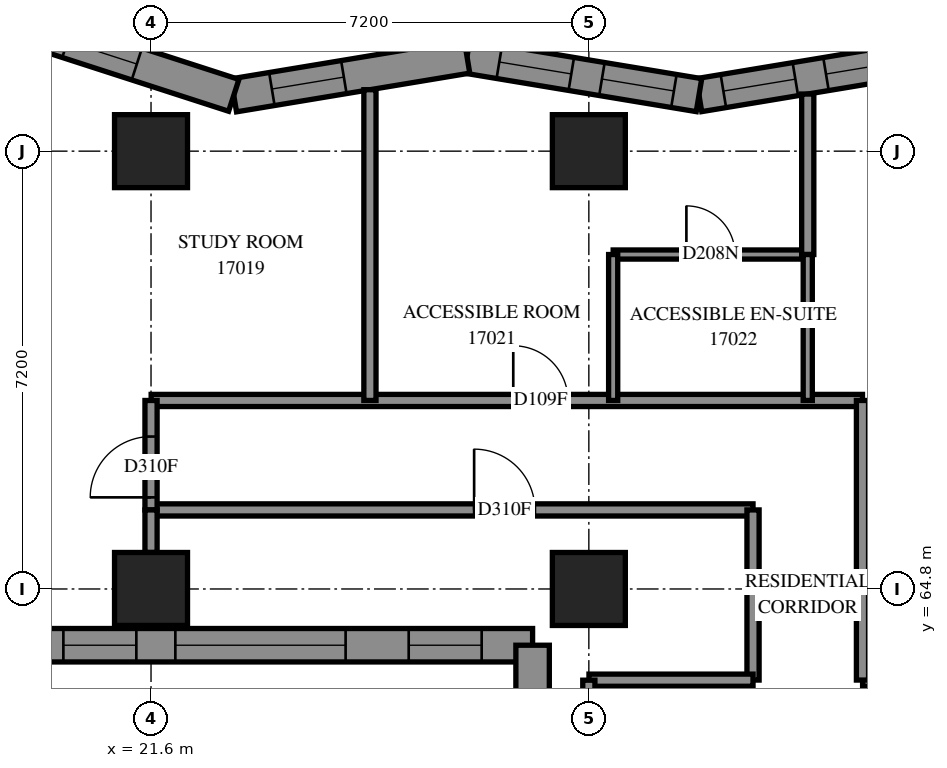
"""IFC4 building model, lengths in metres.
Left out: names, types, materials, properties, quantities, classifications, styles, units other than length and angle.
Written with IfcOpenShell. Run it as: python <this file> out.ifc"""

import sys

from ifc_helpers import new_model, si_unit, direction, frame, frame_2d, origin, origin_2d, place, context, subcontext, project, spatial, polyline, rectangle, outline, extrude, element, fill, save


model = new_model("IFC4")
c1 = context("Model", 3, precision=1e-05, world=origin(), true_north=direction((0.0, 1.0)))
c2 = subcontext(c1, "Body", "Model", "MODEL_VIEW")
j1 = project(units=[si_unit("LENGTHUNIT", "METRE"), si_unit("PLANEANGLEUNIT", "RADIAN")], contexts=[c1])
p1 = place(None, origin())
s1 = spatial("IfcSite", under=j1, at=p1, CompositionType="ELEMENT")
p2 = place(p1, origin())
s2 = spatial("IfcBuilding", under=s1, at=p2, CompositionType="ELEMENT")
p3 = place(p2, frame((0.0, 0.0, 64.4)))
s3 = spatial("IfcBuildingStorey", under=s2, at=p3, CompositionType="ELEMENT", Elevation=64.4)
for number, where, z_axis, x_axis in (
    (1, (21.6, 64.8, 0.0), (0.0, 0.0, 1.0), (1.0, 0.0, 0.0)),
    (2, (21.6, 72.0, 0.0), (0.0, 0.0, 1.0), (1.0, 0.0, 0.0)),
    (3, (28.8, 64.8, 0.0), (0.0, 0.0, 1.0), (1.0, 0.0, 0.0)),
    (4, (28.8, 72.0, 0.0), (0.0, 0.0, 1.0), (1.0, 0.0, 0.0)),
):
    element("IfcColumn", number, at=place(p3, frame(where, z_axis=z_axis, x_axis=x_axis)), inside=s3, PredefinedType="COLUMN", context=c2, shape_type="SweptSolid", body=[
        extrude(rectangle(XDim=1.2, YDim=1.2, at=origin_2d()), origin(), (0.0, 0.0, 1.0), 3.1),
    ])
p4 = place(p3, frame((34.426, 73.554, 0.0), z_axis=(0.0, 0.0, 1.0), x_axis=(-0.9865103981, -0.1636986085, 0.0)))
e5 = element("IfcWall", 5, at=p4, inside=s3, PredefinedType="SOLIDWALL", context=c2, shape_type="SweptSolid", body=[
    extrude(outline(polyline([(-0.046, -0.275), (3.821, -0.275), (3.913, 0.275), (0.046, 0.275), (-0.046, -0.275)])), origin(), (0.0, 0.0, 1.0), 3.1),
])
p5 = place(p4, frame((0.55, 0.0, 0.5)))
e6 = element("IfcOpeningElement", 6, at=p5, cuts=e5, PredefinedType="OPENING", context=c2, shape_type="SweptSolid", body=[
    extrude(rectangle(XDim=1.2, YDim=2.45, at=frame_2d((0.6, 1.225))), frame((0.0, 0.285, 0.0), z_axis=(0.0, -1.0, 0.0), x_axis=(1.0, 0.0, 0.0)), (0.0, 0.0, 1.0), 0.57),
])
p6 = place(p4, frame((2.26, 0.0, 0.5)))
e7 = element("IfcOpeningElement", 7, at=p6, cuts=e5, PredefinedType="OPENING", context=c2, shape_type="SweptSolid", body=[
    extrude(rectangle(XDim=1.2, YDim=2.45, at=frame_2d((0.6, 1.225))), frame((0.0, 0.285, 0.0), z_axis=(0.0, -1.0, 0.0), x_axis=(1.0, 0.0, 0.0)), (0.0, 0.0, 1.0), 0.57),
])
p7 = place(p3, frame((30.611, 72.921, 0.0), z_axis=(0.0, 0.0, 1.0), x_axis=(-0.9865110911, 0.1636944324, 0.0)))
e8 = element("IfcWall", 8, at=p7, inside=s3, PredefinedType="SOLIDWALL", context=c2, shape_type="SweptSolid", body=[
    extrude(outline(polyline([(0.046, -0.275), (3.913, -0.275), (3.821, 0.275), (-0.046, 0.275), (0.046, -0.275)])), origin(), (0.0, 0.0, 1.0), 3.1),
])
p8 = place(p7, frame((0.418, 0.0, 0.5)))
e9 = element("IfcOpeningElement", 9, at=p8, cuts=e8, PredefinedType="OPENING", context=c2, shape_type="SweptSolid", body=[
    extrude(rectangle(XDim=1.2, YDim=2.45, at=frame_2d((0.6, 1.225))), frame((0.0, 0.285, 0.0), z_axis=(0.0, -1.0, 0.0), x_axis=(1.0, 0.0, 0.0)), (0.0, 0.0, 1.0), 0.57),
])
p9 = place(p7, frame((2.129, 0.0, 0.5)))
e10 = element("IfcOpeningElement", 10, at=p9, cuts=e8, PredefinedType="OPENING", context=c2, shape_type="SweptSolid", body=[
    extrude(rectangle(XDim=1.2, YDim=2.45, at=frame_2d((0.6, 1.225))), frame((0.0, 0.285, 0.0), z_axis=(0.0, -1.0, 0.0), x_axis=(1.0, 0.0, 0.0)), (0.0, 0.0, 1.0), 0.57),
])
p10 = place(p3, frame((26.797, 73.554, 0.0), z_axis=(0.0, 0.0, 1.0), x_axis=(-0.9865146039, -0.1636732608, 0.0)))
e11 = element("IfcWall", 11, at=p10, inside=s3, PredefinedType="SOLIDWALL", context=c2, shape_type="SweptSolid", body=[
    extrude(outline(polyline([(-0.046, -0.275), (3.821, -0.275), (3.955, 0.275), (0.046, 0.275), (-0.046, -0.275)])), origin(), (0.0, 0.0, 1.0), 3.1),
])
p11 = place(p10, frame((2.053, 0.0, 0.5)))
e12 = element("IfcOpeningElement", 12, at=p11, cuts=e11, PredefinedType="OPENING", context=c2, shape_type="SweptSolid", body=[
    extrude(rectangle(XDim=1.2, YDim=2.45, at=frame_2d((0.6, 1.225))), frame((0.0, 0.285, 0.0), z_axis=(0.0, -1.0, 0.0), x_axis=(1.0, 0.0, 0.0)), (0.0, 0.0, 1.0), 0.57),
])
p12 = place(p3, frame((22.961, 72.918, 0.0), z_axis=(0.0, 0.0, 1.0), x_axis=(-0.9515343902, 0.3075423616, 0.0)))
e13 = element("IfcWall", 13, at=p12, inside=s3, PredefinedType="SOLIDWALL", context=c2, shape_type="SweptSolid", body=[
    extrude(outline(polyline([(0.067, -0.275), (4.076, -0.275), (3.32, 0.275), (-0.067, 0.275), (0.067, -0.275)])), origin(), (0.0, 0.0, 1.0), 3.1),
])
p13 = place(p12, frame((1.675, 0.0, 0.5)))
e14 = element("IfcOpeningElement", 14, at=p13, cuts=e13, PredefinedType="OPENING", context=c2, shape_type="SweptSolid", body=[
    extrude(rectangle(XDim=1.2, YDim=2.45, at=frame_2d((0.6, 1.225))), frame((0.0, 0.285, 0.0), z_axis=(0.0, -1.0, 0.0), x_axis=(1.0, 0.0, 0.0)), (0.0, 0.0, 1.0), 0.57),
])
p14 = place(p3, frame((19.442, 63.875, 0.0), z_axis=(0.0, 0.0, 1.0), x_axis=(1.0, 0.0, 0.0)))
e15 = element("IfcWall", 15, at=p14, inside=s3, PredefinedType="SOLIDWALL", context=c2, shape_type="SweptSolid", body=[
    extrude(outline(polyline([(-0.275, -0.275), (8.158, -0.275), (8.708, 0.275), (0.275, 0.275), (-0.275, -0.275)])), origin(), (0.0, 0.0, 1.0), 3.1),
])
p15 = place(p14, frame((2.558, 0.0, 0.5)))
e16 = element("IfcOpeningElement", 16, at=p15, cuts=e15, PredefinedType="OPENING", context=c2, shape_type="SweptSolid", body=[
    extrude(rectangle(XDim=2.8, YDim=2.45, at=frame_2d((1.4, 1.225))), frame((0.0, 0.285, 0.0), z_axis=(0.0, -1.0, 0.0), x_axis=(1.0, 0.0, 0.0)), (0.0, 0.0, 1.0), 0.57),
])
p16 = place(p14, frame((0.717, 0.0, 0.5)))
e17 = element("IfcOpeningElement", 17, at=p16, cuts=e15, PredefinedType="OPENING", context=c2, shape_type="SweptSolid", body=[
    extrude(rectangle(XDim=1.2, YDim=2.45, at=frame_2d((0.6, 1.225))), frame((0.0, 0.285, 0.0), z_axis=(0.0, -1.0, 0.0), x_axis=(1.0, 0.0, 0.0)), (0.0, 0.0, 1.0), 0.57),
])
p17 = place(p14, frame((6.396, 0.0, 0.5)))
e18 = element("IfcOpeningElement", 18, at=p17, cuts=e15, PredefinedType="OPENING", context=c2, shape_type="SweptSolid", body=[
    extrude(rectangle(XDim=1.2, YDim=2.45, at=frame_2d((0.6, 1.225))), frame((0.0, 0.285, 0.0), z_axis=(0.0, -1.0, 0.0), x_axis=(1.0, 0.0, 0.0)), (0.0, 0.0, 1.0), 0.57),
])
p18 = place(p3, frame((27.875, 63.875, 0.0), z_axis=(0.0, 0.0, 1.0), x_axis=(0.0, -1.0, 0.0)))
e19 = element("IfcWall", 19, at=p18, inside=s3, PredefinedType="SOLIDWALL", context=c2, shape_type="SweptSolid", body=[
    extrude(outline(polyline([(0.275, -0.275), (8.708, -0.275), (8.158, 0.275), (-0.275, 0.275), (0.275, -0.275)])), origin(), (0.0, 0.0, 1.0), 3.1),
])
p19 = place(p18, frame((0.838, 0.0, 0.5)))
e20 = element("IfcOpeningElement", 20, at=p19, cuts=e19, PredefinedType="OPENING", context=c2, shape_type="SweptSolid", body=[
    extrude(rectangle(XDim=1.2, YDim=2.45, at=frame_2d((0.6, 1.225))), frame((0.0, 0.285, 0.0), z_axis=(0.0, -1.0, 0.0), x_axis=(1.0, 0.0, 0.0)), (0.0, 0.0, 1.0), 0.57),
])
p20 = place(p18, frame((6.516, 0.0, 0.5)))
e21 = element("IfcOpeningElement", 21, at=p20, cuts=e19, PredefinedType="OPENING", context=c2, shape_type="SweptSolid", body=[
    extrude(rectangle(XDim=1.2, YDim=2.45, at=frame_2d((0.6, 1.225))), frame((0.0, 0.285, 0.0), z_axis=(0.0, -1.0, 0.0), x_axis=(1.0, 0.0, 0.0)), (0.0, 0.0, 1.0), 0.57),
])
p21 = place(p18, frame((3.325, 0.0, 0.45)))
e22 = element("IfcOpeningElement", 22, at=p21, cuts=e19, PredefinedType="OPENING", context=c2, shape_type="SweptSolid", body=[
    extrude(rectangle(XDim=1.3, YDim=2.5, at=frame_2d((0.65, 1.25))), frame((0.0, 0.285, 0.0), z_axis=(0.0, -1.0, 0.0), x_axis=(1.0, 0.0, 0.0)), (0.0, 0.0, 1.0), 0.57),
])
p22 = place(p18, frame((4.875, 0.0, 0.45)))
e23 = element("IfcOpeningElement", 23, at=p22, cuts=e19, PredefinedType="OPENING", context=c2, shape_type="SweptSolid", body=[
    extrude(rectangle(XDim=1.0, YDim=2.5, at=frame_2d((0.5, 1.25))), frame((0.0, 0.285, 0.0), z_axis=(0.0, -1.0, 0.0), x_axis=(1.0, 0.0, 0.0)), (0.0, 0.0, 1.0), 0.57),
])
p23 = place(p3, frame((33.302, 63.3, 0.0), z_axis=(0.0, 0.0, 1.0), x_axis=(1.0, 0.0, 0.0)))
e24 = element("IfcWall", 24, at=p23, inside=s3, PredefinedType="PARTITIONING", context=c2, shape_type="SweptSolid", body=[
    extrude(rectangle(XDim=21.798, YDim=0.2, at=frame_2d((10.899, 0.0))), origin(), (0.0, 0.0, 1.0), 3.1),
])
p24 = place(p23, frame((1.091, 0.0, 0.0)))
e25 = element("IfcOpeningElement", 25, at=p24, cuts=e24, PredefinedType="OPENING", context=c2, shape_type="SweptSolid", body=[
    extrude(rectangle(XDim=0.9, YDim=2.1, at=frame_2d((0.45, 1.05))), frame((0.0, 0.11, 0.0), z_axis=(0.0, -1.0, 0.0), x_axis=(1.0, 0.0, 0.0)), (0.0, 0.0, 1.0), 0.22),
])
p25 = place(p23, frame((8.248, 0.0, 0.0)))
e26 = element("IfcOpeningElement", 26, at=p25, cuts=e24, PredefinedType="OPENING", context=c2, shape_type="SweptSolid", body=[
    extrude(rectangle(XDim=0.9, YDim=2.1, at=frame_2d((0.45, 1.05))), frame((0.0, 0.11, 0.0), z_axis=(0.0, -1.0, 0.0), x_axis=(1.0, 0.0, 0.0)), (0.0, 0.0, 1.0), 0.22),
])
p26 = place(p23, frame((15.448, 0.0, 0.0)))
e27 = element("IfcOpeningElement", 27, at=p26, cuts=e24, PredefinedType="OPENING", context=c2, shape_type="SweptSolid", body=[
    extrude(rectangle(XDim=0.9, YDim=2.1, at=frame_2d((0.45, 1.05))), frame((0.0, 0.11, 0.0), z_axis=(0.0, -1.0, 0.0), x_axis=(1.0, 0.0, 0.0)), (0.0, 0.0, 1.0), 0.22),
])
p27 = place(p3, frame((21.602, 67.9, 0.0), z_axis=(0.0, 0.0, 1.0), x_axis=(1.0, 0.0, 0.0)))
e28 = element("IfcWall", 28, at=p27, inside=s3, PredefinedType="PARTITIONING", context=c2, shape_type="SweptSolid", body=[
    extrude(rectangle(XDim=11.698, YDim=0.2, at=frame_2d((5.849, 0.0))), origin(), (0.0, 0.0, 1.0), 3.1),
])
p28 = place(p27, frame((5.955, 0.0, 0.0)))
e29 = element("IfcOpeningElement", 29, at=p28, cuts=e28, PredefinedType="OPENING", context=c2, shape_type="SweptSolid", body=[
    extrude(rectangle(XDim=0.9, YDim=2.1, at=frame_2d((0.45, 1.05))), frame((0.0, 0.11, 0.0), z_axis=(0.0, -1.0, 0.0), x_axis=(1.0, 0.0, 0.0)), (0.0, 0.0, 1.0), 0.22),
])
p29 = place(p3, frame((21.6, 66.1, 0.0), z_axis=(0.0, 0.0, 1.0), x_axis=(1.0, 0.0, 0.0)))
e30 = element("IfcWall", 30, at=p29, inside=s3, PredefinedType="PARTITIONING", context=c2, shape_type="SweptSolid", body=[
    extrude(rectangle(XDim=9.9, YDim=0.2, at=frame_2d((4.95, 0.0))), origin(), (0.0, 0.0, 1.0), 3.1),
])
p30 = place(p29, frame((5.314, 0.0, 0.0)))
e31 = element("IfcOpeningElement", 31, at=p30, cuts=e30, PredefinedType="OPENING", context=c2, shape_type="SweptSolid", body=[
    extrude(rectangle(XDim=1.0, YDim=2.1, at=frame_2d((0.5, 1.05))), frame((0.0, 0.11, 0.0), z_axis=(0.0, -1.0, 0.0), x_axis=(1.0, 0.0, 0.0)), (0.0, 0.0, 1.0), 0.22),
])
p31 = place(p3, frame((25.2, 67.9, 0.0), z_axis=(0.0, 0.0, 1.0), x_axis=(0.0, 1.0, 0.0)))
e32 = element("IfcWall", 32, at=p31, inside=s3, PredefinedType="PARTITIONING", context=c2, shape_type="SweptSolid", body=[
    extrude(rectangle(XDim=5.111, YDim=0.2, at=frame_2d((2.555, 0.0))), origin(), (0.0, 0.0, 1.0), 3.1),
])
p32 = place(p3, frame((33.3, 63.302, 0.0), z_axis=(0.0, 0.0, 1.0), x_axis=(0.0, 1.0, 0.0)))
e33 = element("IfcWall", 33, at=p32, inside=s3, PredefinedType="PARTITIONING", context=c2, shape_type="SweptSolid", body=[
    extrude(rectangle(XDim=4.598, YDim=0.2, at=frame_2d((2.299, 0.0))), origin(), (0.0, 0.0, 1.0), 3.1),
])
p33 = place(p3, frame((29.2, 70.3, 0.0), z_axis=(0.0, 0.0, 1.0), x_axis=(1.0, 0.0, 0.0)))
e34 = element("IfcWall", 34, at=p33, inside=s3, PredefinedType="PARTITIONING", context=c2, shape_type="SweptSolid", body=[
    extrude(rectangle(XDim=3.2, YDim=0.15, at=frame_2d((1.6, 0.0))), origin(), (0.0, 0.0, 1.0), 3.1),
])
p34 = place(p33, frame((1.204, 0.0, 0.0)))
e35 = element("IfcOpeningElement", 35, at=p34, cuts=e34, PredefinedType="OPENING", context=c2, shape_type="SweptSolid", body=[
    extrude(rectangle(XDim=0.8, YDim=2.1, at=frame_2d((0.4, 1.05))), frame((0.0, 0.085, 0.0), z_axis=(0.0, -1.0, 0.0), x_axis=(1.0, 0.0, 0.0)), (0.0, 0.0, 1.0), 0.17),
])
p35 = place(p3, frame((31.5, 63.302, 0.0), z_axis=(0.0, 0.0, 1.0), x_axis=(0.0, 1.0, 0.0)))
e36 = element("IfcWall", 36, at=p35, inside=s3, PredefinedType="PARTITIONING", context=c2, shape_type="SweptSolid", body=[
    extrude(rectangle(XDim=2.798, YDim=0.2, at=frame_2d((1.399, 0.0))), origin(), (0.0, 0.0, 1.0), 3.1),
])
p36 = place(p3, frame((28.802, 63.3, 0.0), z_axis=(0.0, 0.0, 1.0), x_axis=(1.0, 0.0, 0.0)))
e37 = element("IfcWall", 37, at=p36, inside=s3, PredefinedType="PARTITIONING", context=c2, shape_type="SweptSolid", body=[
    extrude(rectangle(XDim=2.698, YDim=0.2, at=frame_2d((1.349, 0.0))), origin(), (0.0, 0.0, 1.0), 3.1),
])
p37 = place(p3, frame((32.4, 70.3, 0.0), z_axis=(0.0, 0.0, 1.0), x_axis=(0.0, 1.0, 0.0)))
e38 = element("IfcWall", 38, at=p37, inside=s3, PredefinedType="PARTITIONING", context=c2, shape_type="SweptSolid", body=[
    extrude(rectangle(XDim=2.639, YDim=0.2, at=frame_2d((1.32, 0.0))), origin(), (0.0, 0.0, 1.0), 3.1),
])
for number, where, z_axis, x_axis in (
    (39, (29.2, 67.9, 0.0), (0.0, 0.0, 1.0), (0.0, 1.0, 0.0)),
    (40, (32.4, 67.9, 0.0), (0.0, 0.0, 1.0), (0.0, 1.0, 0.0)),
):
    element("IfcWall", number, at=place(p3, frame(where, z_axis=z_axis, x_axis=x_axis)), inside=s3, PredefinedType="PARTITIONING", context=c2, shape_type="SweptSolid", body=[
        extrude(rectangle(XDim=2.4, YDim=0.15, at=frame_2d((1.2, 0.0))), origin(), (0.0, 0.0, 1.0), 3.1),
    ])
p38 = place(p3, frame((21.6, 66.1, 0.0), z_axis=(0.0, 0.0, 1.0), x_axis=(0.0, 1.0, 0.0)))
e41 = element("IfcWall", 41, at=p38, inside=s3, PredefinedType="PARTITIONING", context=c2, shape_type="SweptSolid", body=[
    extrude(rectangle(XDim=1.8, YDim=0.2, at=frame_2d((0.9, 0.0))), origin(), (0.0, 0.0, 1.0), 2.6),
])
p39 = place(p38, frame((0.207, 0.0, 0.0)))
e42 = element("IfcOpeningElement", 42, at=p39, cuts=e41, PredefinedType="OPENING", context=c2, shape_type="SweptSolid", body=[
    extrude(rectangle(XDim=1.0, YDim=2.1, at=frame_2d((0.5, 1.05))), frame((0.0, 0.11, 0.0), z_axis=(0.0, -1.0, 0.0), x_axis=(1.0, 0.0, 0.0)), (0.0, 0.0, 1.0), 0.22),
])
p40 = place(p3, frame((28.8, 61.5, 0.0), z_axis=(0.0, 0.0, 1.0), x_axis=(0.0, 1.0, 0.0)))
e43 = element("IfcWall", 43, at=p40, inside=s3, PredefinedType="PARTITIONING", context=c2, shape_type="SweptSolid", body=[
    extrude(rectangle(XDim=1.8, YDim=0.2, at=frame_2d((0.9, 0.0))), origin(), (0.0, 0.0, 1.0), 2.6),
])
p41 = place(p3, frame((21.6, 65.4, 0.0), z_axis=(0.0, 0.0, 1.0), x_axis=(0.0, 1.0, 0.0)))
e44 = element("IfcWall", 44, at=p41, inside=s3, PredefinedType="PARTITIONING", context=c2, shape_type="SweptSolid", body=[
    extrude(rectangle(XDim=0.7, YDim=0.2, at=frame_2d((0.35, 0.0))), origin(), (0.0, 0.0, 1.0), 2.6),
])
p42 = place(p5, origin())
e45 = element("IfcWindow", 45, at=p42, inside=s3, PartitioningType="SINGLE_PANEL", PredefinedType="WINDOW", context=c2, shape_type="SweptSolid", body=[
    extrude(rectangle(XDim=1.2, YDim=2.45, at=frame_2d((0.6, 1.225))), frame((0.0, 0.155, 0.0), z_axis=(0.0, -1.0, 0.0), x_axis=(1.0, 0.0, 0.0)), (0.0, 0.0, 1.0), 0.06),
])
fill(e6, e45)
p43 = place(p6, origin())
e46 = element("IfcWindow", 46, at=p43, inside=s3, PartitioningType="SINGLE_PANEL", PredefinedType="WINDOW", context=c2, shape_type="SweptSolid", body=[
    extrude(rectangle(XDim=1.2, YDim=2.45, at=frame_2d((0.6, 1.225))), frame((0.0, 0.155, 0.0), z_axis=(0.0, -1.0, 0.0), x_axis=(1.0, 0.0, 0.0)), (0.0, 0.0, 1.0), 0.06),
])
fill(e7, e46)
p44 = place(p8, origin())
e47 = element("IfcWindow", 47, at=p44, inside=s3, PartitioningType="SINGLE_PANEL", PredefinedType="WINDOW", context=c2, shape_type="SweptSolid", body=[
    extrude(rectangle(XDim=1.2, YDim=2.45, at=frame_2d((0.6, 1.225))), frame((0.0, 0.155, 0.0), z_axis=(0.0, -1.0, 0.0), x_axis=(1.0, 0.0, 0.0)), (0.0, 0.0, 1.0), 0.06),
])
fill(e9, e47)
p45 = place(p9, origin())
e48 = element("IfcWindow", 48, at=p45, inside=s3, PartitioningType="SINGLE_PANEL", PredefinedType="WINDOW", context=c2, shape_type="SweptSolid", body=[
    extrude(rectangle(XDim=1.2, YDim=2.45, at=frame_2d((0.6, 1.225))), frame((0.0, 0.155, 0.0), z_axis=(0.0, -1.0, 0.0), x_axis=(1.0, 0.0, 0.0)), (0.0, 0.0, 1.0), 0.06),
])
fill(e10, e48)
p46 = place(p11, origin())
e49 = element("IfcWindow", 49, at=p46, inside=s3, PartitioningType="SINGLE_PANEL", PredefinedType="WINDOW", context=c2, shape_type="SweptSolid", body=[
    extrude(rectangle(XDim=1.2, YDim=2.45, at=frame_2d((0.6, 1.225))), frame((0.0, 0.155, 0.0), z_axis=(0.0, -1.0, 0.0), x_axis=(1.0, 0.0, 0.0)), (0.0, 0.0, 1.0), 0.06),
])
fill(e12, e49)
p47 = place(p13, origin())
e50 = element("IfcWindow", 50, at=p47, inside=s3, PartitioningType="SINGLE_PANEL", PredefinedType="WINDOW", context=c2, shape_type="SweptSolid", body=[
    extrude(rectangle(XDim=1.2, YDim=2.45, at=frame_2d((0.6, 1.225))), frame((0.0, 0.155, 0.0), z_axis=(0.0, -1.0, 0.0), x_axis=(1.0, 0.0, 0.0)), (0.0, 0.0, 1.0), 0.06),
])
fill(e14, e50)
p48 = place(p15, origin())
e51 = element("IfcWindow", 51, at=p48, inside=s3, PartitioningType="SINGLE_PANEL", PredefinedType="WINDOW", context=c2, shape_type="SweptSolid", body=[
    extrude(rectangle(XDim=2.8, YDim=2.45, at=frame_2d((1.4, 1.225))), frame((0.0, 0.155, 0.0), z_axis=(0.0, -1.0, 0.0), x_axis=(1.0, 0.0, 0.0)), (0.0, 0.0, 1.0), 0.06),
])
fill(e16, e51)
p49 = place(p16, origin())
e52 = element("IfcWindow", 52, at=p49, inside=s3, PartitioningType="SINGLE_PANEL", PredefinedType="WINDOW", context=c2, shape_type="SweptSolid", body=[
    extrude(rectangle(XDim=1.2, YDim=2.45, at=frame_2d((0.6, 1.225))), frame((0.0, 0.155, 0.0), z_axis=(0.0, -1.0, 0.0), x_axis=(1.0, 0.0, 0.0)), (0.0, 0.0, 1.0), 0.06),
])
fill(e17, e52)
p50 = place(p17, origin())
e53 = element("IfcWindow", 53, at=p50, inside=s3, PartitioningType="SINGLE_PANEL", PredefinedType="WINDOW", context=c2, shape_type="SweptSolid", body=[
    extrude(rectangle(XDim=1.2, YDim=2.45, at=frame_2d((0.6, 1.225))), frame((0.0, 0.155, 0.0), z_axis=(0.0, -1.0, 0.0), x_axis=(1.0, 0.0, 0.0)), (0.0, 0.0, 1.0), 0.06),
])
fill(e18, e53)
p51 = place(p39, origin())
e54 = element("IfcDoor", 54, at=p51, inside=s3, OperationType="SINGLE_SWING_RIGHT", PredefinedType="DOOR", context=c2, shape_type="SweptSolid", body=[
    extrude(rectangle(XDim=1.0, YDim=2.1, at=frame_2d((0.5, 1.05))), frame((0.0, 0.025, 0.0), z_axis=(0.0, -1.0, 0.0), x_axis=(1.0, 0.0, 0.0)), (0.0, 0.0, 1.0), 0.05),
])
fill(e42, e54)
p52 = place(p30, origin())
e55 = element("IfcDoor", 55, at=p52, inside=s3, OperationType="SINGLE_SWING_LEFT", PredefinedType="DOOR", context=c2, shape_type="SweptSolid", body=[
    extrude(rectangle(XDim=1.0, YDim=2.1, at=frame_2d((0.5, 1.05))), frame((0.0, 0.025, 0.0), z_axis=(0.0, -1.0, 0.0), x_axis=(1.0, 0.0, 0.0)), (0.0, 0.0, 1.0), 0.05),
])
fill(e31, e55)
p53 = place(p28, origin())
e56 = element("IfcDoor", 56, at=p53, inside=s3, OperationType="SINGLE_SWING_LEFT", PredefinedType="DOOR", context=c2, shape_type="SweptSolid", body=[
    extrude(rectangle(XDim=0.9, YDim=2.1, at=frame_2d((0.45, 1.05))), frame((0.0, 0.025, 0.0), z_axis=(0.0, -1.0, 0.0), x_axis=(1.0, 0.0, 0.0)), (0.0, 0.0, 1.0), 0.05),
])
fill(e29, e56)
p54 = place(p34, origin())
e57 = element("IfcDoor", 57, at=p54, inside=s3, OperationType="SINGLE_SWING_RIGHT", PredefinedType="DOOR", context=c2, shape_type="SweptSolid", body=[
    extrude(rectangle(XDim=0.8, YDim=2.1, at=frame_2d((0.4, 1.05))), frame((0.0, 0.025, 0.0), z_axis=(0.0, -1.0, 0.0), x_axis=(1.0, 0.0, 0.0)), (0.0, 0.0, 1.0), 0.05),
])
fill(e35, e57)
save(model, sys.argv[1])
